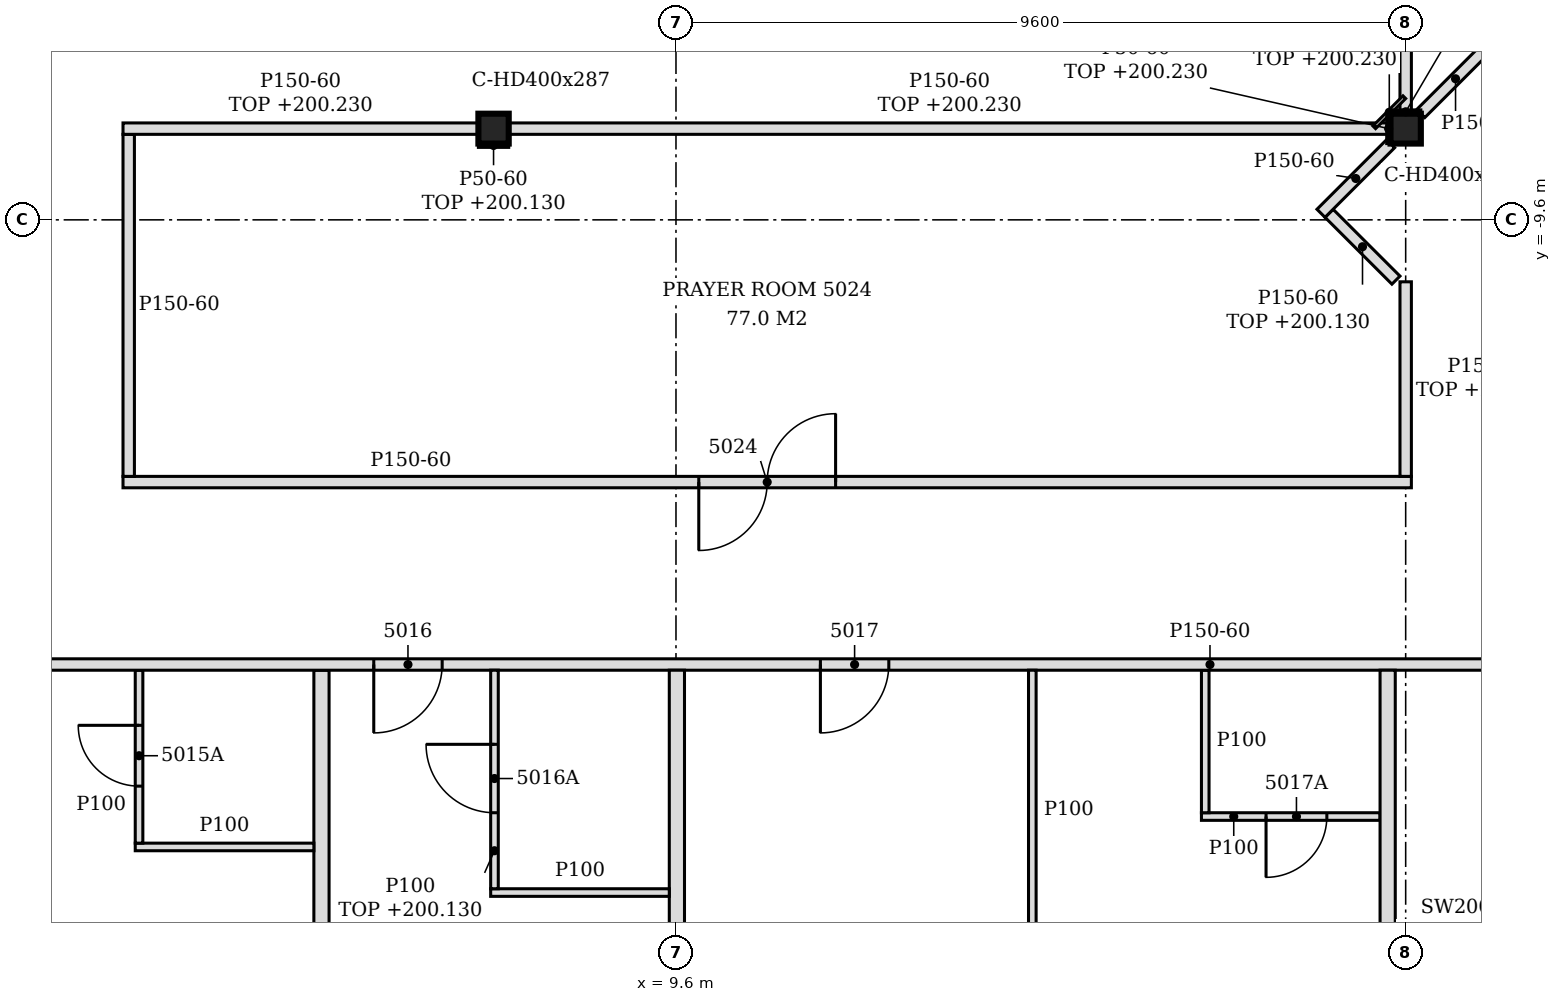
"""IFC4 building model, lengths in metres.
Left out: names, types, materials, properties, quantities, classifications, styles, units other than length and angle.
Written with IfcOpenShell. Run it as: python <this file> out.ifc"""

import sys

from ifc_helpers import new_model, si_unit, direction, frame, frame_2d, origin, origin_2d, place, context, subcontext, project, spatial, polyline, rectangle, i_section, outline, extrude, element, fill, save


model = new_model("IFC4")
c1 = context("Model", 3, precision=1e-05, world=origin(), true_north=direction((0.0, 1.0)))
c2 = subcontext(c1, "Body", "Model", "MODEL_VIEW")
j1 = project(units=[si_unit("LENGTHUNIT", "METRE"), si_unit("PLANEANGLEUNIT", "RADIAN")], contexts=[c1])
p1 = place(None, origin())
s1 = spatial("IfcSite", under=j1, at=p1, CompositionType="ELEMENT")
p2 = place(p1, origin())
s2 = spatial("IfcBuilding", under=s1, at=p2, CompositionType="ELEMENT")
p3 = place(p2, frame((0.0, 0.0, 197.4)))
s3 = spatial("IfcBuildingStorey", under=s2, at=p3, CompositionType="ELEMENT", Elevation=197.4)
for number, where, z_axis, x_axis in (
    (1, (7.2, -8.4, -0.15), (0.0, 0.0, 1.0), (1.0, 0.0, 0.0)),
    (2, (19.2, -8.4, -0.15), (0.0, 0.0, 1.0), (1.0, 0.0, 0.0)),
):
    element("IfcColumn", number, at=place(p3, frame(where, z_axis=z_axis, x_axis=x_axis)), inside=s3, PredefinedType="COLUMN", context=c2, shape_type="SweptSolid", body=[
        extrude(i_section(OverallWidth=0.399, OverallDepth=0.393, WebThickness=0.023, FlangeThickness=0.037, FilletRadius=0.015, at=origin_2d()), origin(), (0.0, 0.0, 1.0), 3.6),
    ])
p4 = place(p3, frame((4.936, -23.47, 0.0), z_axis=(0.0, 0.0, 1.0), x_axis=(0.0, 1.0, 0.0)))
e3 = element("IfcWall", 3, at=p4, inside=s3, PredefinedType="PARTITIONING", context=c2, shape_type="SweptSolid", body=[
    extrude(outline(polyline([(0.0, 0.0), (7.945, 0.0), (7.945, 3.45), (4.37, 3.45), (4.368, 2.93), (4.17, 2.93), (4.168, 3.45), (0.52, 3.45), (0.518, 2.93), (0.22, 2.93), (0.218, 3.45), (0.0, 3.45), (0.0, 0.0)])), frame((0.0, 0.1, 0.0), z_axis=(0.0, -1.0, 0.0), x_axis=(1.0, 0.0, 0.0)), (0.0, 0.0, 1.0), 0.2),
])
p5 = place(p3, frame((14.288, -23.47, 0.0), z_axis=(0.0, 0.0, 1.0), x_axis=(0.0, 1.0, 0.0)))
e4 = element("IfcWall", 4, at=p5, inside=s3, PredefinedType="PARTITIONING", context=c2, shape_type="SweptSolid", body=[
    extrude(outline(polyline([(0.0, 0.0), (7.945, 0.0), (7.945, 3.45), (4.375, 3.45), (4.373, 2.88), (4.165, 2.88), (4.163, 3.45), (0.52, 3.45), (0.518, 2.93), (0.22, 2.93), (0.218, 3.45), (0.0, 3.45), (0.0, 0.0)])), frame((0.0, 0.05, 0.0), z_axis=(0.0, -1.0, 0.0), x_axis=(1.0, 0.0, 0.0)), (0.0, 0.0, 1.0), 0.1),
])
p6 = place(p5, frame((3.37, 0.0, 0.0)))
e5 = element("IfcOpeningElement", 5, at=p6, cuts=e4, PredefinedType="OPENING", context=c2, shape_type="SweptSolid", body=[
    extrude(rectangle(XDim=0.9, YDim=2.1, at=frame_2d((0.45, 1.05))), frame((0.0, 0.06, 0.0), z_axis=(0.0, -1.0, 0.0), x_axis=(1.0, 0.0, 0.0)), (0.0, 0.0, 1.0), 0.12),
])
p7 = place(p3, frame((9.612, -22.684, 0.0), z_axis=(0.0, 0.0, 1.0), x_axis=(0.0, 1.0, 0.0)))
e6 = element("IfcWall", 6, at=p7, inside=s3, PredefinedType="PARTITIONING", context=c2, shape_type="SweptSolid", body=[
    extrude(outline(polyline([(0.086, 0.0), (7.158, 0.0), (7.158, 0.863), (7.158, 1.725), (7.158, 2.588), (7.158, 2.88), (0.024, 2.88), (0.036, 2.588), (0.072, 1.725), (0.086, 0.863), (0.086, 0.0)])), frame((0.0, 0.1, 0.0), z_axis=(0.0, -1.0, 0.0), x_axis=(1.0, 0.0, 0.0)), (0.0, 0.0, 1.0), 0.2),
])
p8 = place(p3, frame((18.963, -22.684, 0.0), z_axis=(0.0, 0.0, 1.0), x_axis=(0.0, 1.0, 0.0)))
e7 = element("IfcWall", 7, at=p8, inside=s3, PredefinedType="PARTITIONING", context=c2, shape_type="SweptSolid", body=[
    extrude(outline(polyline([(0.086, 0.0), (7.158, 0.0), (7.158, 0.863), (7.158, 1.725), (7.158, 2.588), (7.158, 2.88), (0.024, 2.88), (0.036, 2.588), (0.072, 1.725), (0.086, 0.863), (0.086, 0.0)])), frame((0.0, 0.1, 0.0), z_axis=(0.0, -1.0, 0.0), x_axis=(1.0, 0.0, 0.0)), (0.0, 0.0, 1.0), 0.2),
])
p9 = place(p3, frame((7.162, -18.45, 0.0), z_axis=(0.0, 0.0, 1.0), x_axis=(1.0, 0.0, 0.0)))
e8 = element("IfcWall", 8, at=p9, inside=s3, PredefinedType="PARTITIONING", context=c2, shape_type="SweptSolid", body=[
    extrude(outline(polyline([(0.0, 0.0), (2.35, 0.0), (2.35, 3.45), (0.188, 3.45), (0.186, 2.73), (0.0, 2.73), (0.0, 0.0)])), frame((0.0, 0.05, 0.0), z_axis=(0.0, -1.0, 0.0), x_axis=(1.0, 0.0, 0.0)), (0.0, 0.0, 1.0), 0.1),
])
p10 = place(p3, frame((7.212, -18.4, 0.0), z_axis=(0.0, 0.0, 1.0), x_axis=(0.0, 1.0, 0.0)))
e9 = element("IfcWall", 9, at=p10, inside=s3, PredefinedType="PARTITIONING", context=c2, shape_type="SweptSolid", body=[
    extrude(rectangle(XDim=2.875, YDim=0.1, at=frame_2d((1.438, 0.0))), origin(), (0.0, 0.0, 1.0), 2.73),
])
p11 = place(p10, frame((1.0, 0.0, 0.0)))
e10 = element("IfcOpeningElement", 10, at=p11, cuts=e9, PredefinedType="OPENING", context=c2, shape_type="SweptSolid", body=[
    extrude(rectangle(XDim=0.9, YDim=2.1, at=frame_2d((0.45, 1.05))), frame((0.0, 0.06, 0.0), z_axis=(0.0, -1.0, 0.0), x_axis=(1.0, 0.0, 0.0)), (0.0, 0.0, 1.0), 0.12),
])
p12 = place(p3, frame((2.486, -17.85, 0.0), z_axis=(0.0, 0.0, 1.0), x_axis=(1.0, 0.0, 0.0)))
e11 = element("IfcWall", 11, at=p12, inside=s3, PredefinedType="PARTITIONING", context=c2, shape_type="SweptSolid", body=[
    extrude(rectangle(XDim=2.35, YDim=0.1, at=frame_2d((1.175, 0.0))), origin(), (0.0, 0.0, 1.0), 3.45),
])
p13 = place(p3, frame((2.536, -17.8, 0.0), z_axis=(0.0, 0.0, 1.0), x_axis=(0.0, 1.0, 0.0)))
e12 = element("IfcWall", 12, at=p13, inside=s3, PredefinedType="PARTITIONING", context=c2, shape_type="SweptSolid", body=[
    extrude(rectangle(XDim=2.275, YDim=0.1, at=frame_2d((1.138, 0.0))), origin(), (0.0, 0.0, 1.0), 3.45),
])
p14 = place(p13, frame((0.75, 0.0, 0.0)))
e13 = element("IfcOpeningElement", 13, at=p14, cuts=e12, PredefinedType="OPENING", context=c2, shape_type="SweptSolid", body=[
    extrude(rectangle(XDim=0.8, YDim=2.1, at=frame_2d((0.4, 1.05))), frame((0.0, 0.06, 0.0), z_axis=(0.0, -1.0, 0.0), x_axis=(1.0, 0.0, 0.0)), (0.0, 0.0, 1.0), 0.12),
])
p15 = place(p3, frame((16.513, -17.45, 0.0), z_axis=(0.0, 0.0, 1.0), x_axis=(1.0, 0.0, 0.0)))
e14 = element("IfcWall", 14, at=p15, inside=s3, PredefinedType="PARTITIONING", context=c2, shape_type="SweptSolid", body=[
    extrude(rectangle(XDim=2.35, YDim=0.1, at=frame_2d((1.175, 0.0))), origin(), (0.0, 0.0, 1.0), 3.45),
])
p16 = place(p15, frame((0.85, 0.0, 0.0)))
e15 = element("IfcOpeningElement", 15, at=p16, cuts=e14, PredefinedType="OPENING", context=c2, shape_type="SweptSolid", body=[
    extrude(rectangle(XDim=0.8, YDim=2.1, at=frame_2d((0.4, 1.05))), frame((0.0, 0.06, 0.0), z_axis=(0.0, -1.0, 0.0), x_axis=(1.0, 0.0, 0.0)), (0.0, 0.0, 1.0), 0.12),
])
p17 = place(p3, frame((16.563, -17.4, 0.0), z_axis=(0.0, 0.0, 1.0), x_axis=(0.0, 1.0, 0.0)))
e16 = element("IfcWall", 16, at=p17, inside=s3, PredefinedType="PARTITIONING", context=c2, shape_type="SweptSolid", body=[
    extrude(rectangle(XDim=1.875, YDim=0.1, at=frame_2d((0.938, 0.0))), origin(), (0.0, 0.0, 1.0), 3.45),
])
p18 = place(p3, frame((-1.25, -15.45, 0.0), z_axis=(0.0, 0.0, 1.0), x_axis=(1.0, 0.0, 0.0)))
e17 = element("IfcWall", 17, at=p18, inside=s3, PredefinedType="PARTITIONING", context=c2, shape_type="SweptSolid", body=[
    extrude(outline(polyline([(0.0, 0.0), (26.346, 0.0), (26.346, 3.45), (20.6, 3.45), (20.598, 2.73), (20.3, 2.73), (20.298, 3.45), (8.6, 3.45), (8.598, 2.73), (8.3, 2.73), (8.298, 3.45), (0.0, 3.45), (0.0, 0.0)])), frame((0.0, 0.075, 0.0), z_axis=(0.0, -1.0, 0.0), x_axis=(1.0, 0.0, 0.0)), (0.0, 0.0, 1.0), 0.15),
])
p19 = place(p18, frame((22.101, 0.0, 0.0)))
e18 = element("IfcOpeningElement", 18, at=p19, cuts=e17, PredefinedType="OPENING", context=c2, shape_type="SweptSolid", body=[
    extrude(rectangle(XDim=0.9, YDim=2.1, at=frame_2d((0.45, 1.05))), frame((0.0, 0.085, 0.0), z_axis=(0.0, -1.0, 0.0), x_axis=(1.0, 0.0, 0.0)), (0.0, 0.0, 1.0), 0.17),
])
p20 = place(p18, frame((1.496, 0.0, 0.0)))
e19 = element("IfcOpeningElement", 19, at=p20, cuts=e17, PredefinedType="OPENING", context=c2, shape_type="SweptSolid", body=[
    extrude(rectangle(XDim=0.9, YDim=2.1, at=frame_2d((0.45, 1.05))), frame((0.0, 0.085, 0.0), z_axis=(0.0, -1.0, 0.0), x_axis=(1.0, 0.0, 0.0)), (0.0, 0.0, 1.0), 0.17),
])
p21 = place(p18, frame((6.874, 0.0, 0.0)))
e20 = element("IfcOpeningElement", 20, at=p21, cuts=e17, PredefinedType="OPENING", context=c2, shape_type="SweptSolid", body=[
    extrude(rectangle(XDim=0.9, YDim=2.1, at=frame_2d((0.45, 1.05))), frame((0.0, 0.085, 0.0), z_axis=(0.0, -1.0, 0.0), x_axis=(1.0, 0.0, 0.0)), (0.0, 0.0, 1.0), 0.17),
])
p22 = place(p18, frame((12.75, 0.0, 0.0)))
e21 = element("IfcOpeningElement", 21, at=p22, cuts=e17, PredefinedType="OPENING", context=c2, shape_type="SweptSolid", body=[
    extrude(rectangle(XDim=0.9, YDim=2.1, at=frame_2d((0.45, 1.05))), frame((0.0, 0.085, 0.0), z_axis=(0.0, -1.0, 0.0), x_axis=(1.0, 0.0, 0.0)), (0.0, 0.0, 1.0), 0.17),
])
p23 = place(p3, frame((2.325, -13.05, 0.0), z_axis=(0.0, 0.0, 1.0), x_axis=(1.0, 0.0, 0.0)))
e22 = element("IfcWall", 22, at=p23, inside=s3, PredefinedType="PARTITIONING", context=c2, shape_type="SweptSolid", body=[
    extrude(outline(polyline([(0.0, 0.0), (16.95, 0.0), (16.95, 2.73), (16.725, 2.73), (16.723, 3.45), (5.025, 3.45), (5.023, 2.73), (4.725, 2.73), (4.723, 3.45), (0.0, 3.45), (0.0, 0.0)])), frame((0.0, 0.075, 0.0), z_axis=(0.0, -1.0, 0.0), x_axis=(1.0, 0.0, 0.0)), (0.0, 0.0, 1.0), 0.15),
])
p24 = place(p23, frame((7.575, 0.0, 0.0)))
e23 = element("IfcOpeningElement", 23, at=p24, cuts=e22, PredefinedType="OPENING", context=c2, shape_type="SweptSolid", body=[
    extrude(rectangle(XDim=1.8, YDim=2.1, at=frame_2d((0.9, 1.05))), frame((0.0, 0.085, 0.0), z_axis=(0.0, -1.0, 0.0), x_axis=(1.0, 0.0, 0.0)), (0.0, 0.0, 1.0), 0.17),
])
p25 = place(p3, frame((2.4, -12.975, 0.0), z_axis=(0.0, 0.0, 1.0), x_axis=(0.0, 1.0, 0.0)))
e24 = element("IfcWall", 24, at=p25, inside=s3, PredefinedType="PARTITIONING", context=c2, shape_type="SweptSolid", body=[
    extrude(outline(polyline([(0.0, 0.0), (4.5, 0.0), (4.5, 2.83), (4.425, 2.83), (4.423, 3.45), (0.0, 3.45), (0.0, 0.0)])), frame((0.0, 0.075, 0.0), z_axis=(0.0, -1.0, 0.0), x_axis=(1.0, 0.0, 0.0)), (0.0, 0.0, 1.0), 0.15),
])
p26 = place(p3, frame((19.2, -12.975, 0.0), z_axis=(0.0, 0.0, 1.0), x_axis=(0.0, 1.0, 0.0)))
e25 = element("IfcWall", 25, at=p26, inside=s3, PredefinedType="PARTITIONING", context=c2, shape_type="SweptSolid", body=[
    extrude(rectangle(XDim=2.56, YDim=0.15, at=frame_2d((1.28, 0.0))), origin(), (0.0, 0.0, 1.0), 2.73),
])
p27 = place(p3, frame((19.072, -10.393, 0.0), z_axis=(0.0, 0.0, 1.0), x_axis=(-0.70740114323, 0.706812296552, 0.0)))
e26 = element("IfcWall", 26, at=p27, inside=s3, PredefinedType="PARTITIONING", context=c2, shape_type="SweptSolid", body=[
    extrude(rectangle(XDim=1.244, YDim=0.15, at=frame_2d((0.622, 0.0))), origin(), (0.0, 0.0, 1.0), 2.73),
])
p28 = place(p3, frame((18.086, -9.514, 0.0), z_axis=(0.0, 0.0, 1.0), x_axis=(0.707106781187, 0.707106781187, 0.0)))
e27 = element("IfcWall", 27, at=p28, inside=s3, PredefinedType="PARTITIONING", context=c2, shape_type="SweptSolid", body=[
    extrude(rectangle(XDim=1.295, YDim=0.15, at=frame_2d((0.648, 0.0))), origin(), (0.0, 0.0, 1.0), 3.45),
])
p29 = place(p3, frame((2.325, -8.4, 0.0), z_axis=(0.0, 0.0, 1.0), x_axis=(1.0, 0.0, 0.0)))
e28 = element("IfcWall", 28, at=p29, inside=s3, PredefinedType="PARTITIONING", context=c2, shape_type="SweptSolid", body=[
    extrude(rectangle(XDim=4.676, YDim=0.15, at=frame_2d((2.338, 0.0))), origin(), (0.0, 0.0, 1.0), 2.83),
])
p30 = place(p3, frame((7.399, -8.4, 0.0), z_axis=(0.0, 0.0, 1.0), x_axis=(1.0, 0.0, 0.0)))
e29 = element("IfcWall", 29, at=p30, inside=s3, PredefinedType="PARTITIONING", context=c2, shape_type="SweptSolid", body=[
    extrude(rectangle(XDim=11.601, YDim=0.15, at=frame_2d((5.801, 0.0))), origin(), (0.0, 0.0, 1.0), 2.83),
])
p31 = place(p3, frame((19.2, -8.204, 0.0), z_axis=(0.0, 0.0, 1.0), x_axis=(0.0, 1.0, 0.0)))
e30 = element("IfcWall", 30, at=p31, inside=s3, PredefinedType="PARTITIONING", context=c2, shape_type="SweptSolid", body=[
    extrude(rectangle(XDim=9.329, YDim=0.15, at=frame_2d((4.664, 0.0))), origin(), (0.0, 0.0, 1.0), 2.83),
])
p32 = place(p31, frame((7.354, 0.0, 0.0)))
e31 = element("IfcOpeningElement", 31, at=p32, cuts=e30, PredefinedType="OPENING", context=c2, shape_type="SweptSolid", body=[
    extrude(rectangle(XDim=0.8, YDim=2.1, at=frame_2d((0.4, 1.05))), frame((0.0, 0.085, 0.0), z_axis=(0.0, -1.0, 0.0), x_axis=(1.0, 0.0, 0.0)), (0.0, 0.0, 1.0), 0.17),
])
p33 = place(p3, frame((19.398, -8.202, 0.0), z_axis=(0.0, 0.0, 1.0), x_axis=(0.707200993001, 0.707012556818, 0.0)))
e32 = element("IfcWall", 32, at=p33, inside=s3, PredefinedType="PARTITIONING", context=c2, shape_type="SweptSolid", body=[
    extrude(rectangle(XDim=1.296, YDim=0.15, at=frame_2d((0.648, 0.0))), origin(), (0.0, 0.0, 1.0), 3.45),
])
p34 = place(p3, frame((18.786, -8.382, 0.0), z_axis=(0.0, 0.0, 1.0), x_axis=(0.707106781187, 0.707106781187, 0.0)))
e33 = element("IfcWall", 33, at=p34, inside=s3, PredefinedType="PARTITIONING", context=c2, shape_type="SweptSolid", body=[
    extrude(rectangle(XDim=0.56, YDim=0.05, at=frame_2d((0.28, 0.0))), origin(), (0.0, 0.0, 1.0), 2.83),
])
p35 = place(p3, frame((7.0, -8.622, 0.0), z_axis=(0.0, 0.0, 1.0), x_axis=(1.0, 0.0, 0.0)))
e34 = element("IfcWall", 34, at=p35, inside=s3, PredefinedType="PARTITIONING", context=c2, shape_type="SweptSolid", body=[
    extrude(rectangle(XDim=0.399, YDim=0.05, at=frame_2d((0.199, 0.0))), origin(), (0.0, 0.0, 1.0), 2.73),
])
p36 = place(p3, frame((19.0, -8.178, 0.0), z_axis=(0.0, 0.0, 1.0), x_axis=(1.0, 0.0, 0.0)))
e35 = element("IfcWall", 35, at=p36, inside=s3, PredefinedType="PARTITIONING", context=c2, shape_type="SweptSolid", body=[
    extrude(rectangle(XDim=0.399, YDim=0.05, at=frame_2d((0.199, 0.0))), origin(), (0.0, 0.0, 1.0), 2.83),
])
p37 = place(p3, frame((18.976, -8.596, 0.0), z_axis=(0.0, 0.0, 1.0), x_axis=(0.0, 1.0, 0.0)))
e36 = element("IfcWall", 36, at=p37, inside=s3, PredefinedType="PARTITIONING", context=c2, shape_type="SweptSolid", body=[
    extrude(rectangle(XDim=0.393, YDim=0.05, at=frame_2d((0.196, 0.0))), origin(), (0.0, 0.0, 1.0), 2.83),
])
p38 = place(p14, origin())
e37 = element("IfcDoor", 37, at=p38, inside=s3, OperationType="SINGLE_SWING_RIGHT", PredefinedType="DOOR", context=c2, shape_type="SweptSolid", body=[
    extrude(rectangle(XDim=0.8, YDim=2.1, at=frame_2d((0.4, 1.05))), frame((0.0, 0.025, 0.0), z_axis=(0.0, -1.0, 0.0), x_axis=(1.0, 0.0, 0.0)), (0.0, 0.0, 1.0), 0.05),
])
fill(e13, e37)
p39 = place(p21, frame((0.9, 0.0, 0.0), z_axis=(0.0, 0.0, 1.0), x_axis=(-1.0, 0.0, 0.0)))
e38 = element("IfcDoor", 38, at=p39, inside=s3, OperationType="SINGLE_SWING_RIGHT", PredefinedType="DOOR", context=c2, shape_type="SweptSolid", body=[
    extrude(rectangle(XDim=0.9, YDim=2.1, at=frame_2d((0.45, 1.05))), frame((0.0, 0.025, 0.0), z_axis=(0.0, -1.0, 0.0), x_axis=(1.0, 0.0, 0.0)), (0.0, 0.0, 1.0), 0.05),
])
fill(e20, e38)
p40 = place(p11, origin())
e39 = element("IfcDoor", 39, at=p40, inside=s3, OperationType="SINGLE_SWING_RIGHT", PredefinedType="DOOR", context=c2, shape_type="SweptSolid", body=[
    extrude(rectangle(XDim=0.9, YDim=2.1, at=frame_2d((0.45, 1.05))), frame((0.0, 0.025, 0.0), z_axis=(0.0, -1.0, 0.0), x_axis=(1.0, 0.0, 0.0)), (0.0, 0.0, 1.0), 0.05),
])
fill(e10, e39)
p41 = place(p22, frame((0.9, 0.0, 0.0), z_axis=(0.0, 0.0, 1.0), x_axis=(-1.0, 0.0, 0.0)))
e40 = element("IfcDoor", 40, at=p41, inside=s3, OperationType="SINGLE_SWING_RIGHT", PredefinedType="DOOR", context=c2, shape_type="SweptSolid", body=[
    extrude(rectangle(XDim=0.9, YDim=2.1, at=frame_2d((0.45, 1.05))), frame((0.0, 0.025, 0.0), z_axis=(0.0, -1.0, 0.0), x_axis=(1.0, 0.0, 0.0)), (0.0, 0.0, 1.0), 0.05),
])
fill(e21, e40)
p42 = place(p16, frame((0.8, 0.0, 0.0), z_axis=(0.0, 0.0, 1.0), x_axis=(-1.0, 0.0, 0.0)))
e41 = element("IfcDoor", 41, at=p42, inside=s3, OperationType="SINGLE_SWING_RIGHT", PredefinedType="DOOR", context=c2, shape_type="SweptSolid", body=[
    extrude(rectangle(XDim=0.8, YDim=2.1, at=frame_2d((0.4, 1.05))), frame((0.0, 0.025, 0.0), z_axis=(0.0, -1.0, 0.0), x_axis=(1.0, 0.0, 0.0)), (0.0, 0.0, 1.0), 0.05),
])
fill(e15, e41)
p43 = place(p24, origin())
e42 = element("IfcDoor", 42, at=p43, inside=s3, OperationType="DOUBLE_DOOR_SINGLE_SWING", PredefinedType="DOOR", context=c2, shape_type="SweptSolid", body=[
    extrude(rectangle(XDim=1.8, YDim=2.1, at=frame_2d((0.9, 1.05))), frame((0.0, 0.025, 0.0), z_axis=(0.0, -1.0, 0.0), x_axis=(1.0, 0.0, 0.0)), (0.0, 0.0, 1.0), 0.05),
])
fill(e23, e42)
save(model, sys.argv[1])
